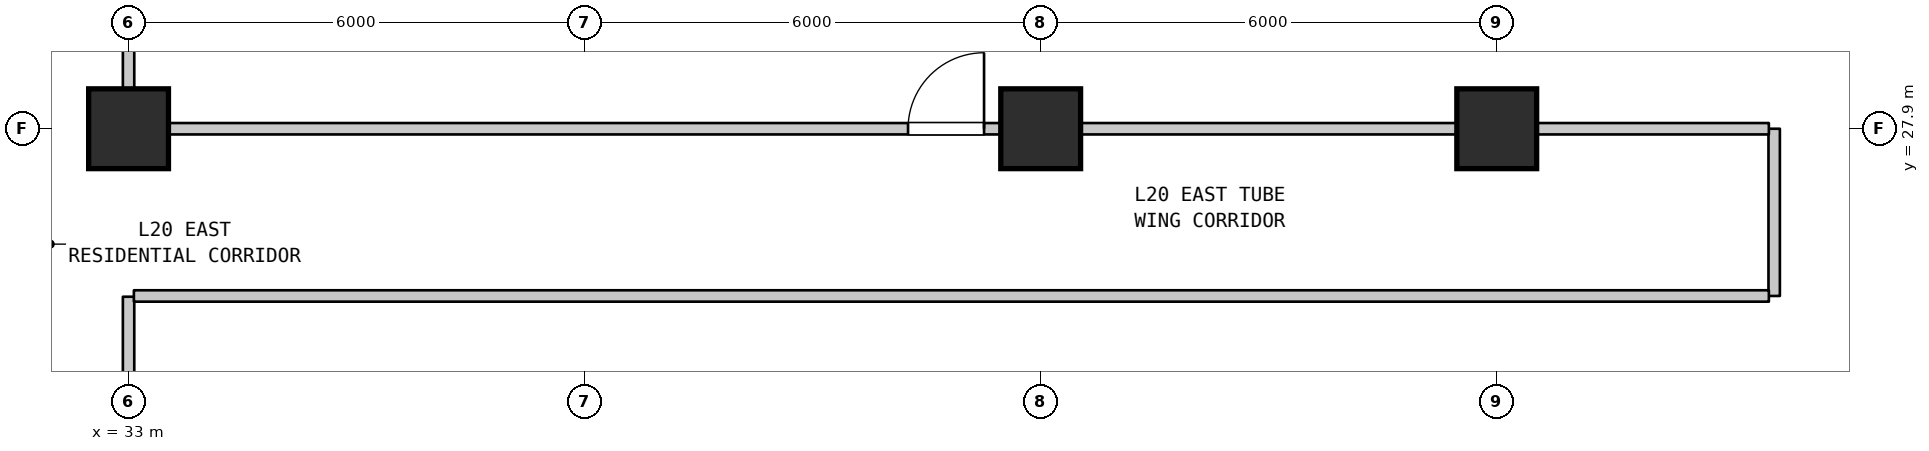
"""IFC4 building model, lengths in metres.
Left out: names, types, materials, properties, quantities, classifications, styles, units other than length and angle.
Written with IfcOpenShell. Run it as: python <this file> out.ifc"""

import sys

from ifc_helpers import new_model, si_unit, direction, frame, frame_2d, origin, origin_2d, place, context, subcontext, project, spatial, rectangle, extrude, element, fill, save


model = new_model("IFC4")
c1 = context("Model", 3, precision=1e-05, world=origin(), true_north=direction((0.0, 1.0)))
c2 = subcontext(c1, "Body", "Model", "MODEL_VIEW")
j1 = project(units=[si_unit("LENGTHUNIT", "METRE"), si_unit("PLANEANGLEUNIT", "RADIAN")], contexts=[c1])
p1 = place(None, origin())
s1 = spatial("IfcSite", under=j1, at=p1, CompositionType="ELEMENT")
p2 = place(p1, origin())
s2 = spatial("IfcBuilding", under=s1, at=p2, CompositionType="ELEMENT")
p3 = place(p2, frame((0.0, 0.0, 86.4)))
s3 = spatial("IfcBuildingStorey", under=s2, at=p3, CompositionType="ELEMENT", Elevation=86.4)
for number, where, z_axis, x_axis in (
    (1, (33.0, 27.9, 0.0), (0.0, 0.0, 1.0), (1.0, 0.0, 0.0)),
    (2, (45.0, 27.9, 0.0), (0.0, 0.0, 1.0), (1.0, 0.0, 0.0)),
    (3, (51.0, 27.9, 0.0), (0.0, 0.0, 1.0), (1.0, 0.0, 0.0)),
):
    element("IfcColumn", number, at=place(p3, frame(where, z_axis=z_axis, x_axis=x_axis)), inside=s3, PredefinedType="COLUMN", context=c2, shape_type="SweptSolid", body=[
        extrude(rectangle(XDim=1.05, YDim=1.05, at=origin_2d()), origin(), (0.0, 0.0, 1.0), 4.5),
    ])
p4 = place(p3, frame((33.0, 19.51, 0.0), z_axis=(0.0, 0.0, 1.0), x_axis=(0.0, 1.0, 0.0)))
e4 = element("IfcWall", 4, at=p4, inside=s3, PredefinedType="STANDARD", context=c2, shape_type="SweptSolid", body=[
    extrude(rectangle(XDim=6.18, YDim=0.15, at=frame_2d((3.09, 0.0))), origin(), (0.0, 0.0, 1.0), 3.735),
])
p5 = place(p3, frame((33.0, 27.91, 0.0), z_axis=(0.0, 0.0, 1.0), x_axis=(0.0, 1.0, 0.0)))
e5 = element("IfcWall", 5, at=p5, inside=s3, PredefinedType="STANDARD", context=c2, shape_type="SweptSolid", body=[
    extrude(rectangle(XDim=9.98, YDim=0.15, at=frame_2d((4.99, 0.0))), origin(), (0.0, 0.0, 1.0), 3.685),
])
p6 = place(p3, frame((54.65, 25.7, 0.0), z_axis=(0.0, 0.0, 1.0), x_axis=(0.0, 1.0, 0.0)))
e6 = element("IfcWall", 6, at=p6, inside=s3, PredefinedType="STANDARD", context=c2, shape_type="SweptSolid", body=[
    extrude(rectangle(XDim=2.2, YDim=0.15, at=frame_2d((1.1, 0.0))), origin(), (0.0, 0.0, 1.0), 4.185),
])
p7 = place(p3, frame((33.07, 25.7, 0.0), z_axis=(0.0, 0.0, 1.0), x_axis=(1.0, 0.0, 0.0)))
e7 = element("IfcWall", 7, at=p7, inside=s3, PredefinedType="STANDARD", context=c2, shape_type="SweptSolid", body=[
    extrude(rectangle(XDim=21.51, YDim=0.15, at=frame_2d((10.755, 0.0))), origin(), (0.0, 0.0, 1.0), 4.185),
])
p8 = place(p3, frame((33.07, 27.9, 0.0), z_axis=(0.0, 0.0, 1.0), x_axis=(1.0, 0.0, 0.0)))
e8 = element("IfcWall", 8, at=p8, inside=s3, PredefinedType="STANDARD", context=c2, shape_type="SweptSolid", body=[
    extrude(rectangle(XDim=11.93, YDim=0.15, at=frame_2d((5.965, 0.0))), origin(), (0.0, 0.0, 1.0), 3.685),
])
p9 = place(p8, frame((10.185, 0.0, 0.0)))
e9 = element("IfcOpeningElement", 9, at=p9, cuts=e8, PredefinedType="OPENING", context=c2, shape_type="SweptSolid", body=[
    extrude(rectangle(XDim=1.0, YDim=2.15, at=frame_2d((0.5, 1.075))), frame((0.0, 0.085, 0.0), z_axis=(0.0, -1.0, 0.0), x_axis=(1.0, 0.0, 0.0)), (0.0, 0.0, 1.0), 0.17),
])
p10 = place(p3, frame((45.0, 27.9, 0.0), z_axis=(0.0, 0.0, 1.0), x_axis=(1.0, 0.0, 0.0)))
e10 = element("IfcWall", 10, at=p10, inside=s3, PredefinedType="STANDARD", context=c2, shape_type="SweptSolid", body=[
    extrude(rectangle(XDim=9.58, YDim=0.15, at=frame_2d((4.79, 0.0))), origin(), (0.0, 0.0, 1.0), 3.735),
])
p11 = place(p9, origin())
e11 = element("IfcDoor", 11, at=p11, inside=s3, OperationType="SINGLE_SWING_RIGHT", PredefinedType="DOOR", context=c2, shape_type="SweptSolid", body=[
    extrude(rectangle(XDim=1.0, YDim=2.15, at=frame_2d((0.5, 1.075))), frame((0.0, 0.025, 0.0), z_axis=(0.0, -1.0, 0.0), x_axis=(1.0, 0.0, 0.0)), (0.0, 0.0, 1.0), 0.05),
])
fill(e9, e11)
save(model, sys.argv[1])
